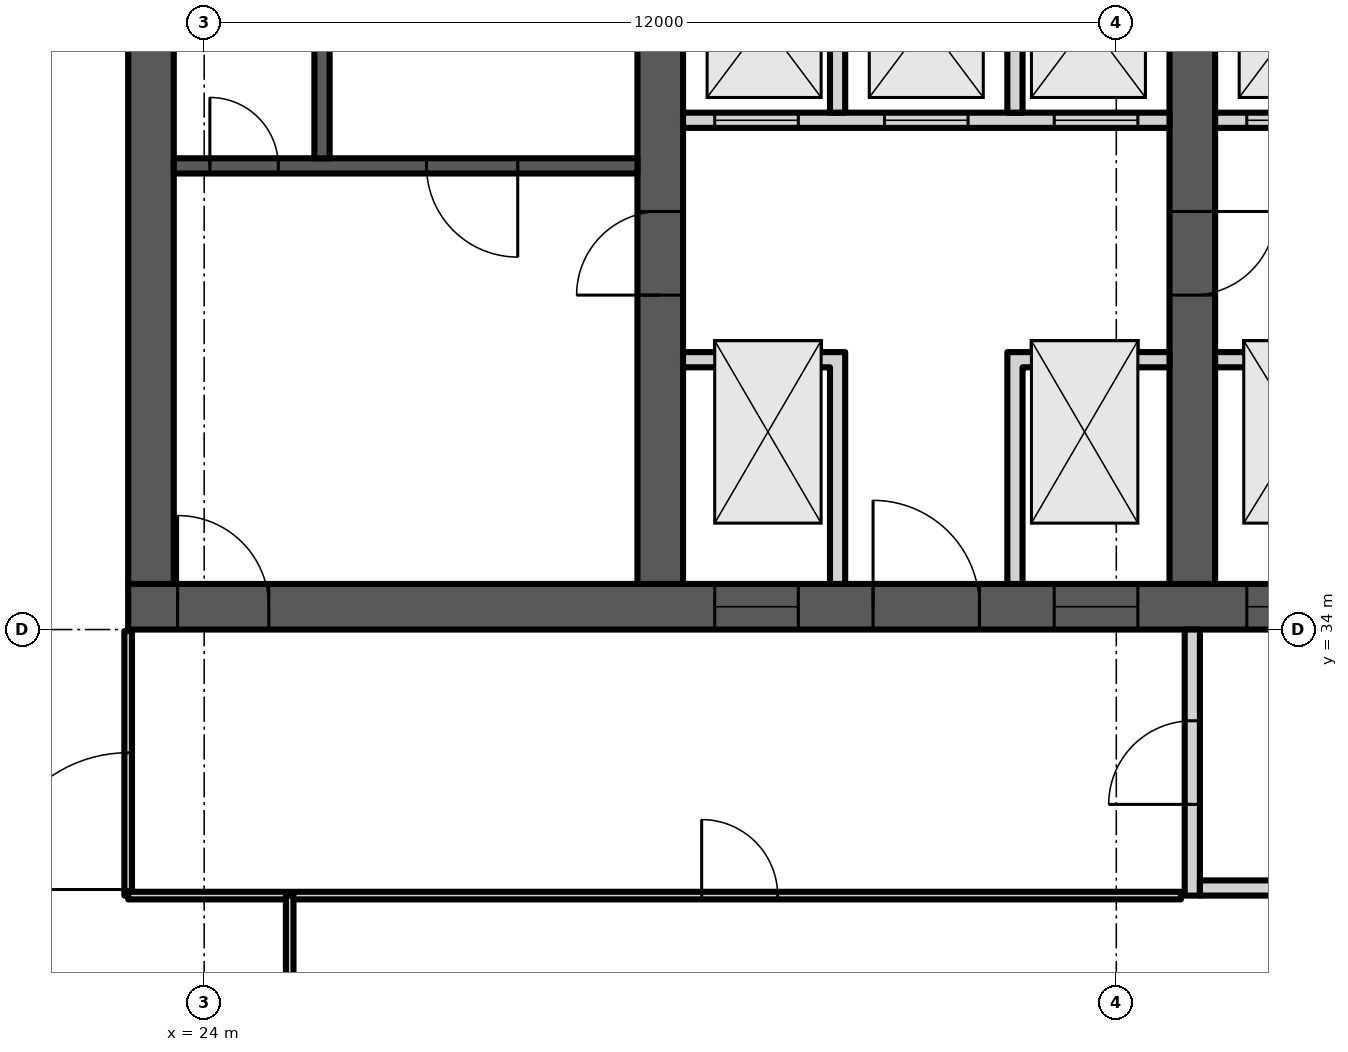
"""IFC4 building model, lengths in metres.
Left out: names, types, materials, properties, quantities, classifications, styles, units other than length and angle.
Written with IfcOpenShell. Run it as: python <this file> out.ifc"""

import sys

from ifc_helpers import new_model, si_unit, direction, frame, frame_2d, origin, place, context, subcontext, project, spatial, polyline, rectangle, outline, extrude, element, fill, save


model = new_model("IFC4")
c1 = context("Model", 3, precision=1e-05, world=origin(), true_north=direction((0.0, 1.0)))
c2 = subcontext(c1, "Body", "Model", "MODEL_VIEW")
j1 = project(units=[si_unit("LENGTHUNIT", "METRE"), si_unit("PLANEANGLEUNIT", "RADIAN")], contexts=[c1])
p1 = place(None, origin())
s1 = spatial("IfcSite", under=j1, at=p1, CompositionType="ELEMENT")
p2 = place(p1, origin())
s2 = spatial("IfcBuilding", under=s1, at=p2, CompositionType="ELEMENT")
p3 = place(p2, frame((0.0, 0.0, 257.5)))
s3 = spatial("IfcBuildingStorey", under=s2, at=p3, CompositionType="ELEMENT", Elevation=257.5)
p4 = place(p3, frame((23.0, 34.3, 0.0), z_axis=(0.0, 0.0, 1.0), x_axis=(1.0, 0.0, 0.0)))
e1 = element("IfcWall", 1, at=p4, inside=s3, PredefinedType="SHEAR", context=c2, shape_type="SweptSolid", body=[
    extrude(rectangle(XDim=35.0, YDim=0.6, at=frame_2d((17.5, 0.0))), origin(), (0.0, 0.0, 1.0), 3.6),
])
p5 = place(p4, frame((0.65, 0.0, 0.0)))
e2 = element("IfcOpeningElement", 2, at=p5, cuts=e1, PredefinedType="OPENING", context=c2, shape_type="SweptSolid", body=[
    extrude(rectangle(XDim=1.2, YDim=2.1, at=frame_2d((0.6, 1.05))), frame((0.0, 0.31, 0.0), z_axis=(0.0, -1.0, 0.0), x_axis=(1.0, 0.0, 0.0)), (0.0, 0.0, 1.0), 0.62),
])
p6 = place(p4, frame((7.717, 0.0, 0.0)))
e3 = element("IfcOpeningElement", 3, at=p6, cuts=e1, PredefinedType="OPENING", context=c2, shape_type="SweptSolid", body=[
    extrude(rectangle(XDim=1.1, YDim=2.1, at=frame_2d((0.55, 1.05))), frame((0.0, 0.31, 0.0), z_axis=(0.0, -1.0, 0.0), x_axis=(1.0, 0.0, 0.0)), (0.0, 0.0, 1.0), 0.62),
])
p7 = place(p4, frame((12.183, 0.0, 0.0)))
e4 = element("IfcOpeningElement", 4, at=p7, cuts=e1, PredefinedType="OPENING", context=c2, shape_type="SweptSolid", body=[
    extrude(rectangle(XDim=1.1, YDim=2.1, at=frame_2d((0.55, 1.05))), frame((0.0, 0.31, 0.0), z_axis=(0.0, -1.0, 0.0), x_axis=(1.0, 0.0, 0.0)), (0.0, 0.0, 1.0), 0.62),
])
p8 = place(p4, frame((9.8, 0.0, 0.0)))
e5 = element("IfcOpeningElement", 5, at=p8, cuts=e1, PredefinedType="OPENING", context=c2, shape_type="SweptSolid", body=[
    extrude(rectangle(XDim=1.4, YDim=2.1, at=frame_2d((0.7, 1.05))), frame((0.0, 0.31, 0.0), z_axis=(0.0, -1.0, 0.0), x_axis=(1.0, 0.0, 0.0)), (0.0, 0.0, 1.0), 0.62),
])
p9 = place(p4, frame((14.717, 0.0, 0.0)))
e6 = element("IfcOpeningElement", 6, at=p9, cuts=e1, PredefinedType="OPENING", context=c2, shape_type="SweptSolid", body=[
    extrude(rectangle(XDim=1.1, YDim=2.1, at=frame_2d((0.55, 1.05))), frame((0.0, 0.31, 0.0), z_axis=(0.0, -1.0, 0.0), x_axis=(1.0, 0.0, 0.0)), (0.0, 0.0, 1.0), 0.62),
])
p10 = place(p4, frame((16.95, 0.0, 0.0)))
e7 = element("IfcOpeningElement", 7, at=p10, cuts=e1, PredefinedType="OPENING", context=c2, shape_type="SweptSolid", body=[
    extrude(rectangle(XDim=1.1, YDim=2.1, at=frame_2d((0.55, 1.05))), frame((0.0, 0.31, 0.0), z_axis=(0.0, -1.0, 0.0), x_axis=(1.0, 0.0, 0.0)), (0.0, 0.0, 1.0), 0.62),
])
p11 = place(p4, frame((19.183, 0.0, 0.0)))
e8 = element("IfcOpeningElement", 8, at=p11, cuts=e1, PredefinedType="OPENING", context=c2, shape_type="SweptSolid", body=[
    extrude(rectangle(XDim=1.1, YDim=2.1, at=frame_2d((0.55, 1.05))), frame((0.0, 0.31, 0.0), z_axis=(0.0, -1.0, 0.0), x_axis=(1.0, 0.0, 0.0)), (0.0, 0.0, 1.0), 0.62),
])
p12 = place(p4, frame((26.15, 0.0, 0.0)))
e9 = element("IfcOpeningElement", 9, at=p12, cuts=e1, PredefinedType="OPENING", context=c2, shape_type="SweptSolid", body=[
    extrude(rectangle(XDim=1.2, YDim=2.1, at=frame_2d((0.6, 1.05))), frame((0.0, 0.31, 0.0), z_axis=(0.0, -1.0, 0.0), x_axis=(1.0, 0.0, 0.0)), (0.0, 0.0, 1.0), 0.62),
])
p13 = place(p4, frame((30.8, 0.0, 0.0)))
e10 = element("IfcOpeningElement", 10, at=p13, cuts=e1, PredefinedType="OPENING", context=c2, shape_type="SweptSolid", body=[
    extrude(rectangle(XDim=1.4, YDim=2.1, at=frame_2d((0.7, 1.05))), frame((0.0, 0.31, 0.0), z_axis=(0.0, -1.0, 0.0), x_axis=(1.0, 0.0, 0.0)), (0.0, 0.0, 1.0), 0.62),
])
p14 = place(p3, frame((23.3, 34.6, 0.0), z_axis=(0.0, 0.0, 1.0), x_axis=(0.0, 1.0, 0.0)))
e11 = element("IfcWall", 11, at=p14, inside=s3, PredefinedType="SHEAR", context=c2, shape_type="SweptSolid", body=[
    extrude(rectangle(XDim=13.585, YDim=0.6, at=frame_2d((6.792, 0.0))), origin(), (0.0, 0.0, 1.0), 3.6),
])
p15 = place(p3, frame((30.0, 34.6, 0.0), z_axis=(0.0, 0.0, 1.0), x_axis=(0.0, 1.0, 0.0)))
e12 = element("IfcWall", 12, at=p15, inside=s3, PredefinedType="SHEAR", context=c2, shape_type="SweptSolid", body=[
    extrude(rectangle(XDim=14.171, YDim=0.6, at=frame_2d((7.085, 0.0))), origin(), (0.0, 0.0, 1.0), 3.6),
])
p16 = place(p15, frame((3.8, 0.0, 0.0)))
e13 = element("IfcOpeningElement", 13, at=p16, cuts=e12, PredefinedType="OPENING", context=c2, shape_type="SweptSolid", body=[
    extrude(rectangle(XDim=1.1, YDim=2.1, at=frame_2d((0.55, 1.05))), frame((0.0, 0.31, 0.0), z_axis=(0.0, -1.0, 0.0), x_axis=(1.0, 0.0, 0.0)), (0.0, 0.0, 1.0), 0.62),
])
p17 = place(p3, frame((37.0, 34.6, 0.0), z_axis=(0.0, 0.0, 1.0), x_axis=(0.0, 1.0, 0.0)))
e14 = element("IfcWall", 14, at=p17, inside=s3, PredefinedType="SHEAR", context=c2, shape_type="SweptSolid", body=[
    extrude(rectangle(XDim=14.784, YDim=0.6, at=frame_2d((7.392, 0.0))), origin(), (0.0, 0.0, 1.0), 3.6),
])
p18 = place(p17, frame((11.302, 0.0, 0.0)))
e15 = element("IfcOpeningElement", 15, at=p18, cuts=e14, PredefinedType="OPENING", context=c2, shape_type="SweptSolid", body=[
    extrude(rectangle(XDim=1.0, YDim=2.1, at=frame_2d((0.5, 1.05))), frame((0.0, 0.31, 0.0), z_axis=(0.0, -1.0, 0.0), x_axis=(1.0, 0.0, 0.0)), (0.0, 0.0, 1.0), 0.62),
])
p19 = place(p17, frame((3.8, 0.0, 0.0)))
e16 = element("IfcOpeningElement", 16, at=p19, cuts=e14, PredefinedType="OPENING", context=c2, shape_type="SweptSolid", body=[
    extrude(rectangle(XDim=1.1, YDim=2.1, at=frame_2d((0.55, 1.05))), frame((0.0, 0.31, 0.0), z_axis=(0.0, -1.0, 0.0), x_axis=(1.0, 0.0, 0.0)), (0.0, 0.0, 1.0), 0.62),
])
p20 = place(p3, frame((23.6, 40.1, 0.0), z_axis=(0.0, 0.0, 1.0), x_axis=(1.0, 0.0, 0.0)))
e17 = element("IfcWall", 17, at=p20, inside=s3, PredefinedType="SHEAR", context=c2, shape_type="SweptSolid", body=[
    extrude(rectangle(XDim=6.1, YDim=0.2, at=frame_2d((3.05, 0.0))), origin(), (0.0, 0.0, 1.0), 3.2),
])
p21 = place(p20, frame((3.325, 0.0, 0.0)))
e18 = element("IfcOpeningElement", 18, at=p21, cuts=e17, PredefinedType="OPENING", context=c2, shape_type="SweptSolid", body=[
    extrude(rectangle(XDim=1.2, YDim=2.1, at=frame_2d((0.6, 1.05))), frame((0.0, 0.11, 0.0), z_axis=(0.0, -1.0, 0.0), x_axis=(1.0, 0.0, 0.0)), (0.0, 0.0, 1.0), 0.22),
])
p22 = place(p20, frame((0.475, 0.0, 0.0)))
e19 = element("IfcOpeningElement", 19, at=p22, cuts=e17, PredefinedType="OPENING", context=c2, shape_type="SweptSolid", body=[
    extrude(rectangle(XDim=0.9, YDim=2.1, at=frame_2d((0.45, 1.05))), frame((0.0, 0.11, 0.0), z_axis=(0.0, -1.0, 0.0), x_axis=(1.0, 0.0, 0.0)), (0.0, 0.0, 1.0), 0.22),
])
p23 = place(p3, frame((25.55, 40.2, 0.0), z_axis=(0.0, 0.0, 1.0), x_axis=(0.0, 1.0, 0.0)))
e20 = element("IfcWall", 20, at=p23, inside=s3, PredefinedType="SHEAR", context=c2, shape_type="SweptSolid", body=[
    extrude(rectangle(XDim=7.2, YDim=0.2, at=frame_2d((3.6, 0.0))), origin(), (0.0, 0.0, 1.0), 3.2),
])
p24 = place(p3, frame((30.3, 40.7, 0.0), z_axis=(0.0, 0.0, 1.0), x_axis=(1.0, 0.0, 0.0)))
e21 = element("IfcWall", 21, at=p24, inside=s3, PredefinedType="PARTITIONING", context=c2, shape_type="SweptSolid", body=[
    extrude(rectangle(XDim=6.4, YDim=0.2, at=frame_2d((3.2, 0.0))), origin(), (0.0, 0.0, 1.0), 3.2),
])
p25 = place(p24, frame((0.417, 0.0, 0.0)))
e22 = element("IfcOpeningElement", 22, at=p25, cuts=e21, PredefinedType="OPENING", context=c2, shape_type="SweptSolid", body=[
    extrude(rectangle(XDim=1.1, YDim=2.1, at=frame_2d((0.55, 1.05))), frame((0.0, 0.11, 0.0), z_axis=(0.0, -1.0, 0.0), x_axis=(1.0, 0.0, 0.0)), (0.0, 0.0, 1.0), 0.22),
])
p26 = place(p24, frame((2.65, 0.0, 0.0)))
e23 = element("IfcOpeningElement", 23, at=p26, cuts=e21, PredefinedType="OPENING", context=c2, shape_type="SweptSolid", body=[
    extrude(rectangle(XDim=1.1, YDim=2.1, at=frame_2d((0.55, 1.05))), frame((0.0, 0.11, 0.0), z_axis=(0.0, -1.0, 0.0), x_axis=(1.0, 0.0, 0.0)), (0.0, 0.0, 1.0), 0.22),
])
p27 = place(p24, frame((4.883, 0.0, 0.0)))
e24 = element("IfcOpeningElement", 24, at=p27, cuts=e21, PredefinedType="OPENING", context=c2, shape_type="SweptSolid", body=[
    extrude(rectangle(XDim=1.1, YDim=2.1, at=frame_2d((0.55, 1.05))), frame((0.0, 0.11, 0.0), z_axis=(0.0, -1.0, 0.0), x_axis=(1.0, 0.0, 0.0)), (0.0, 0.0, 1.0), 0.22),
])
p28 = place(p3, frame((0.0, 0.0, -0.0)))
e25 = element("IfcWall", 25, at=p28, inside=s3, PredefinedType="PARTITIONING", context=c2, shape_type="SweptSolid", body=[
    extrude(outline(polyline([(32.233, 37.45), (30.3, 37.45), (30.3, 37.65), (32.233, 37.65), (32.433, 37.65), (32.433, 34.6), (32.233, 34.6), (32.233, 37.45)])), origin(), (0.0, 0.0, 1.0), 3.2),
])
p29 = place(p3, frame((0.0, 0.0, -0.0)))
e26 = element("IfcWall", 26, at=p29, inside=s3, PredefinedType="PARTITIONING", context=c2, shape_type="SweptSolid", body=[
    extrude(outline(polyline([(34.567, 37.65), (34.767, 37.65), (36.7, 37.65), (36.7, 37.45), (34.767, 37.45), (34.767, 34.6), (34.567, 34.6), (34.567, 37.65)])), origin(), (0.0, 0.0, 1.0), 3.2),
])
p30 = place(p3, frame((0.0, 0.0, -0.0)))
e27 = element("IfcWall", 27, at=p30, inside=s3, PredefinedType="PARTITIONING", context=c2, shape_type="SweptSolid", body=[
    extrude(outline(polyline([(32.433, 40.8), (32.233, 40.8), (32.233, 43.8), (30.3, 43.8), (30.3, 44.0), (36.7, 44.0), (36.7, 43.8), (34.767, 43.8), (34.767, 40.8), (34.567, 40.8), (34.567, 43.8), (32.433, 43.8), (32.433, 40.8)])), origin(), (0.0, 0.0, 1.0), 3.2),
])
p31 = place(p3, frame((37.3, 40.7, 0.0), z_axis=(0.0, 0.0, 1.0), x_axis=(1.0, 0.0, 0.0)))
e28 = element("IfcWall", 28, at=p31, inside=s3, PredefinedType="PARTITIONING", context=c2, shape_type="SweptSolid", body=[
    extrude(rectangle(XDim=6.4, YDim=0.2, at=frame_2d((3.2, 0.0))), origin(), (0.0, 0.0, 1.0), 3.2),
])
p32 = place(p31, frame((0.417, 0.0, 0.0)))
e29 = element("IfcOpeningElement", 29, at=p32, cuts=e28, PredefinedType="OPENING", context=c2, shape_type="SweptSolid", body=[
    extrude(rectangle(XDim=1.1, YDim=2.1, at=frame_2d((0.55, 1.05))), frame((0.0, 0.11, 0.0), z_axis=(0.0, -1.0, 0.0), x_axis=(1.0, 0.0, 0.0)), (0.0, 0.0, 1.0), 0.22),
])
p33 = place(p31, frame((2.65, 0.0, 0.0)))
e30 = element("IfcOpeningElement", 30, at=p33, cuts=e28, PredefinedType="OPENING", context=c2, shape_type="SweptSolid", body=[
    extrude(rectangle(XDim=1.1, YDim=2.1, at=frame_2d((0.55, 1.05))), frame((0.0, 0.11, 0.0), z_axis=(0.0, -1.0, 0.0), x_axis=(1.0, 0.0, 0.0)), (0.0, 0.0, 1.0), 0.22),
])
p34 = place(p31, frame((4.883, 0.0, 0.0)))
e31 = element("IfcOpeningElement", 31, at=p34, cuts=e28, PredefinedType="OPENING", context=c2, shape_type="SweptSolid", body=[
    extrude(rectangle(XDim=1.1, YDim=2.1, at=frame_2d((0.55, 1.05))), frame((0.0, 0.11, 0.0), z_axis=(0.0, -1.0, 0.0), x_axis=(1.0, 0.0, 0.0)), (0.0, 0.0, 1.0), 0.22),
])
p35 = place(p3, frame((0.0, 0.0, -0.0)))
e32 = element("IfcWall", 32, at=p35, inside=s3, PredefinedType="PARTITIONING", context=c2, shape_type="SweptSolid", body=[
    extrude(outline(polyline([(41.567, 37.1), (39.433, 37.1), (39.433, 34.6), (39.233, 34.6), (39.233, 37.45), (37.3, 37.45), (37.3, 37.65), (39.233, 37.65), (39.433, 37.65), (39.433, 37.3), (41.567, 37.3), (41.567, 37.35), (41.767, 37.35), (43.7, 37.35), (43.7, 37.15), (41.767, 37.15), (41.767, 34.6), (41.567, 34.6), (41.567, 37.1)])), origin(), (0.0, 0.0, 1.0), 3.2),
])
p36 = place(p3, frame((0.0, 0.0, -0.0)))
e33 = element("IfcWall", 33, at=p36, inside=s3, PredefinedType="PARTITIONING", context=c2, shape_type="SweptSolid", body=[
    extrude(outline(polyline([(39.433, 40.8), (39.233, 40.8), (39.233, 43.8), (37.3, 43.8), (37.3, 44.0), (43.7, 44.0), (43.7, 43.8), (41.767, 43.8), (41.767, 40.8), (41.567, 40.8), (41.567, 43.8), (39.433, 43.8), (39.433, 40.8)])), origin(), (0.0, 0.0, 1.0), 3.2),
])
p37 = place(p3, frame((37.0, 30.5, 0.0), z_axis=(0.0, 0.0, 1.0), x_axis=(0.0, 1.0, 0.0)))
e34 = element("IfcWall", 34, at=p37, inside=s3, PredefinedType="PARTITIONING", context=c2, shape_type="SweptSolid", body=[
    extrude(rectangle(XDim=3.5, YDim=0.2, at=frame_2d((1.75, 0.0))), origin(), (0.0, 0.0, 1.0), 3.2),
])
p38 = place(p37, frame((1.2, 0.0, 0.0)))
e35 = element("IfcOpeningElement", 35, at=p38, cuts=e34, PredefinedType="OPENING", context=c2, shape_type="SweptSolid", body=[
    extrude(rectangle(XDim=1.1, YDim=2.1, at=frame_2d((0.55, 1.05))), frame((0.0, 0.11, 0.0), z_axis=(0.0, -1.0, 0.0), x_axis=(1.0, 0.0, 0.0)), (0.0, 0.0, 1.0), 0.22),
])
p39 = place(p3, frame((37.1, 30.6, 0.0), z_axis=(0.0, 0.0, 1.0), x_axis=(1.0, 0.0, 0.0)))
e36 = element("IfcWall", 36, at=p39, inside=s3, PredefinedType="PARTITIONING", context=c2, shape_type="SweptSolid", body=[
    extrude(rectangle(XDim=2.8, YDim=0.2, at=frame_2d((1.4, 0.0))), origin(), (0.0, 0.0, 1.0), 3.2),
])
p40 = place(p3, frame((23.0, 30.5, 0.0), z_axis=(0.0, 0.0, 1.0), x_axis=(0.0, 1.0, 0.0)))
e37 = element("IfcWall", 37, at=p40, inside=s3, PredefinedType="PARTITIONING", context=c2, shape_type="SweptSolid", body=[
    extrude(rectangle(XDim=3.48, YDim=0.1, at=frame_2d((1.74, 0.0))), origin(), (0.0, 0.0, 1.0), 3.2),
])
p41 = place(p40, frame((0.08, 0.0, 0.0)))
e38 = element("IfcOpeningElement", 38, at=p41, cuts=e37, PredefinedType="OPENING", context=c2, shape_type="SweptSolid", body=[
    extrude(rectangle(XDim=1.8, YDim=2.1, at=frame_2d((0.9, 1.05))), frame((0.0, 0.06, 0.0), z_axis=(0.0, -1.0, 0.0), x_axis=(1.0, 0.0, 0.0)), (0.0, 0.0, 1.0), 0.12),
])
p42 = place(p3, frame((23.0, 30.5, 0.0), z_axis=(0.0, 0.0, 1.0), x_axis=(1.0, 0.0, 0.0)))
e39 = element("IfcWall", 39, at=p42, inside=s3, PredefinedType="PARTITIONING", context=c2, shape_type="SweptSolid", body=[
    extrude(rectangle(XDim=13.85, YDim=0.1, at=frame_2d((6.925, 0.0))), origin(), (0.0, 0.0, 1.0), 3.2),
])
p43 = place(p42, frame((7.545, 0.0, 0.0)))
e40 = element("IfcOpeningElement", 40, at=p43, cuts=e39, PredefinedType="OPENING", context=c2, shape_type="SweptSolid", body=[
    extrude(rectangle(XDim=1.0, YDim=2.1, at=frame_2d((0.5, 1.05))), frame((0.0, 0.06, 0.0), z_axis=(0.0, -1.0, 0.0), x_axis=(1.0, 0.0, 0.0)), (0.0, 0.0, 1.0), 0.12),
])
p44 = place(p3, frame((25.125, 19.35, 0.0), z_axis=(0.0, 0.0, 1.0), x_axis=(0.0, 1.0, 0.0)))
e41 = element("IfcWall", 41, at=p44, inside=s3, PredefinedType="PARTITIONING", context=c2, shape_type="SweptSolid", body=[
    extrude(rectangle(XDim=11.15, YDim=0.1, at=frame_2d((5.575, 0.0))), origin(), (0.0, 0.0, 1.0), 3.2),
])
p45 = place(p21, origin())
e42 = element("IfcDoor", 42, at=p45, inside=s3, OperationType="SINGLE_SWING_RIGHT", PredefinedType="DOOR", context=c2, shape_type="SweptSolid", body=[
    extrude(rectangle(XDim=1.2, YDim=2.1, at=frame_2d((0.6, 1.05))), frame((0.0, 0.025, 0.0), z_axis=(0.0, -1.0, 0.0), x_axis=(1.0, 0.0, 0.0)), (0.0, 0.0, 1.0), 0.05),
])
fill(e18, e42)
p46 = place(p22, origin())
e43 = element("IfcDoor", 43, at=p46, inside=s3, OperationType="SINGLE_SWING_LEFT", PredefinedType="DOOR", context=c2, shape_type="SweptSolid", body=[
    extrude(rectangle(XDim=0.9, YDim=2.1, at=frame_2d((0.45, 1.05))), frame((0.0, 0.025, 0.0), z_axis=(0.0, -1.0, 0.0), x_axis=(1.0, 0.0, 0.0)), (0.0, 0.0, 1.0), 0.05),
])
fill(e19, e43)
p47 = place(p5, origin())
e44 = element("IfcDoor", 44, at=p47, inside=s3, OperationType="SINGLE_SWING_LEFT", PredefinedType="DOOR", context=c2, shape_type="SweptSolid", body=[
    extrude(rectangle(XDim=1.2, YDim=2.1, at=frame_2d((0.6, 1.05))), frame((0.0, 0.025, 0.0), z_axis=(0.0, -1.0, 0.0), x_axis=(1.0, 0.0, 0.0)), (0.0, 0.0, 1.0), 0.05),
])
fill(e2, e44)
p48 = place(p6, origin())
e45 = element("IfcDoor", 45, at=p48, inside=s3, OperationType="DOUBLE_DOOR_SLIDING", PredefinedType="DOOR", context=c2, shape_type="SweptSolid", body=[
    extrude(rectangle(XDim=1.1, YDim=2.1, at=frame_2d((0.55, 1.05))), frame((0.0, 0.025, 0.0), z_axis=(0.0, -1.0, 0.0), x_axis=(1.0, 0.0, 0.0)), (0.0, 0.0, 1.0), 0.05),
])
fill(e3, e45)
p49 = place(p7, origin())
e46 = element("IfcDoor", 46, at=p49, inside=s3, OperationType="DOUBLE_DOOR_SLIDING", PredefinedType="DOOR", context=c2, shape_type="SweptSolid", body=[
    extrude(rectangle(XDim=1.1, YDim=2.1, at=frame_2d((0.55, 1.05))), frame((0.0, 0.025, 0.0), z_axis=(0.0, -1.0, 0.0), x_axis=(1.0, 0.0, 0.0)), (0.0, 0.0, 1.0), 0.05),
])
fill(e4, e46)
p50 = place(p8, origin())
e47 = element("IfcDoor", 47, at=p50, inside=s3, OperationType="DOUBLE_DOOR_SINGLE_SWING", PredefinedType="DOOR", context=c2, shape_type="SweptSolid", body=[
    extrude(rectangle(XDim=1.4, YDim=2.1, at=frame_2d((0.7, 1.05))), frame((0.0, 0.025, 0.0), z_axis=(0.0, -1.0, 0.0), x_axis=(1.0, 0.0, 0.0)), (0.0, 0.0, 1.0), 0.05),
])
fill(e5, e47)
p51 = place(p25, origin())
e48 = element("IfcDoor", 48, at=p51, inside=s3, OperationType="DOUBLE_DOOR_SLIDING", PredefinedType="DOOR", context=c2, shape_type="SweptSolid", body=[
    extrude(rectangle(XDim=1.1, YDim=2.1, at=frame_2d((0.55, 1.05))), frame((0.0, 0.025, 0.0), z_axis=(0.0, -1.0, 0.0), x_axis=(1.0, 0.0, 0.0)), (0.0, 0.0, 1.0), 0.05),
])
fill(e22, e48)
p52 = place(p26, origin())
e49 = element("IfcDoor", 49, at=p52, inside=s3, OperationType="DOUBLE_DOOR_SLIDING", PredefinedType="DOOR", context=c2, shape_type="SweptSolid", body=[
    extrude(rectangle(XDim=1.1, YDim=2.1, at=frame_2d((0.55, 1.05))), frame((0.0, 0.025, 0.0), z_axis=(0.0, -1.0, 0.0), x_axis=(1.0, 0.0, 0.0)), (0.0, 0.0, 1.0), 0.05),
])
fill(e23, e49)
p53 = place(p27, origin())
e50 = element("IfcDoor", 50, at=p53, inside=s3, OperationType="DOUBLE_DOOR_SLIDING", PredefinedType="DOOR", context=c2, shape_type="SweptSolid", body=[
    extrude(rectangle(XDim=1.1, YDim=2.1, at=frame_2d((0.55, 1.05))), frame((0.0, 0.025, 0.0), z_axis=(0.0, -1.0, 0.0), x_axis=(1.0, 0.0, 0.0)), (0.0, 0.0, 1.0), 0.05),
])
fill(e24, e50)
p54 = place(p9, origin())
e51 = element("IfcDoor", 51, at=p54, inside=s3, OperationType="DOUBLE_DOOR_SLIDING", PredefinedType="DOOR", context=c2, shape_type="SweptSolid", body=[
    extrude(rectangle(XDim=1.1, YDim=2.1, at=frame_2d((0.55, 1.05))), frame((0.0, 0.025, 0.0), z_axis=(0.0, -1.0, 0.0), x_axis=(1.0, 0.0, 0.0)), (0.0, 0.0, 1.0), 0.05),
])
fill(e6, e51)
p55 = place(p32, origin())
e52 = element("IfcDoor", 52, at=p55, inside=s3, OperationType="DOUBLE_DOOR_SLIDING", PredefinedType="DOOR", context=c2, shape_type="SweptSolid", body=[
    extrude(rectangle(XDim=1.1, YDim=2.1, at=frame_2d((0.55, 1.05))), frame((0.0, 0.025, 0.0), z_axis=(0.0, -1.0, 0.0), x_axis=(1.0, 0.0, 0.0)), (0.0, 0.0, 1.0), 0.05),
])
fill(e29, e52)
p56 = place(p16, origin())
e53 = element("IfcDoor", 53, at=p56, inside=s3, OperationType="SINGLE_SWING_LEFT", PredefinedType="DOOR", context=c2, shape_type="SweptSolid", body=[
    extrude(rectangle(XDim=1.1, YDim=2.1, at=frame_2d((0.55, 1.05))), frame((0.0, 0.025, 0.0), z_axis=(0.0, -1.0, 0.0), x_axis=(1.0, 0.0, 0.0)), (0.0, 0.0, 1.0), 0.05),
])
fill(e13, e53)
p57 = place(p19, origin())
e54 = element("IfcDoor", 54, at=p57, inside=s3, OperationType="SINGLE_SWING_RIGHT", PredefinedType="DOOR", context=c2, shape_type="SweptSolid", body=[
    extrude(rectangle(XDim=1.1, YDim=2.1, at=frame_2d((0.55, 1.05))), frame((0.0, 0.025, 0.0), z_axis=(0.0, -1.0, 0.0), x_axis=(1.0, 0.0, 0.0)), (0.0, 0.0, 1.0), 0.05),
])
fill(e16, e54)
p58 = place(p38, origin())
e55 = element("IfcDoor", 55, at=p58, inside=s3, OperationType="SINGLE_SWING_LEFT", PredefinedType="DOOR", context=c2, shape_type="SweptSolid", body=[
    extrude(rectangle(XDim=1.1, YDim=2.1, at=frame_2d((0.55, 1.05))), frame((0.0, 0.025, 0.0), z_axis=(0.0, -1.0, 0.0), x_axis=(1.0, 0.0, 0.0)), (0.0, 0.0, 1.0), 0.05),
])
fill(e35, e55)
p59 = place(p43, origin())
e56 = element("IfcDoor", 56, at=p59, inside=s3, OperationType="SINGLE_SWING_LEFT", PredefinedType="DOOR", context=c2, shape_type="SweptSolid", body=[
    extrude(rectangle(XDim=1.0, YDim=2.1, at=frame_2d((0.5, 1.05))), frame((0.0, 0.025, 0.0), z_axis=(0.0, -1.0, 0.0), x_axis=(1.0, 0.0, 0.0)), (0.0, 0.0, 1.0), 0.05),
])
fill(e40, e56)
p60 = place(p41, origin())
e57 = element("IfcDoor", 57, at=p60, inside=s3, OperationType="DOUBLE_DOOR_SINGLE_SWING", PredefinedType="DOOR", context=c2, shape_type="SweptSolid", body=[
    extrude(rectangle(XDim=1.8, YDim=2.1, at=frame_2d((0.9, 1.05))), frame((0.0, 0.025, 0.0), z_axis=(0.0, -1.0, 0.0), x_axis=(1.0, 0.0, 0.0)), (0.0, 0.0, 1.0), 0.05),
])
fill(e38, e57)
save(model, sys.argv[1])
